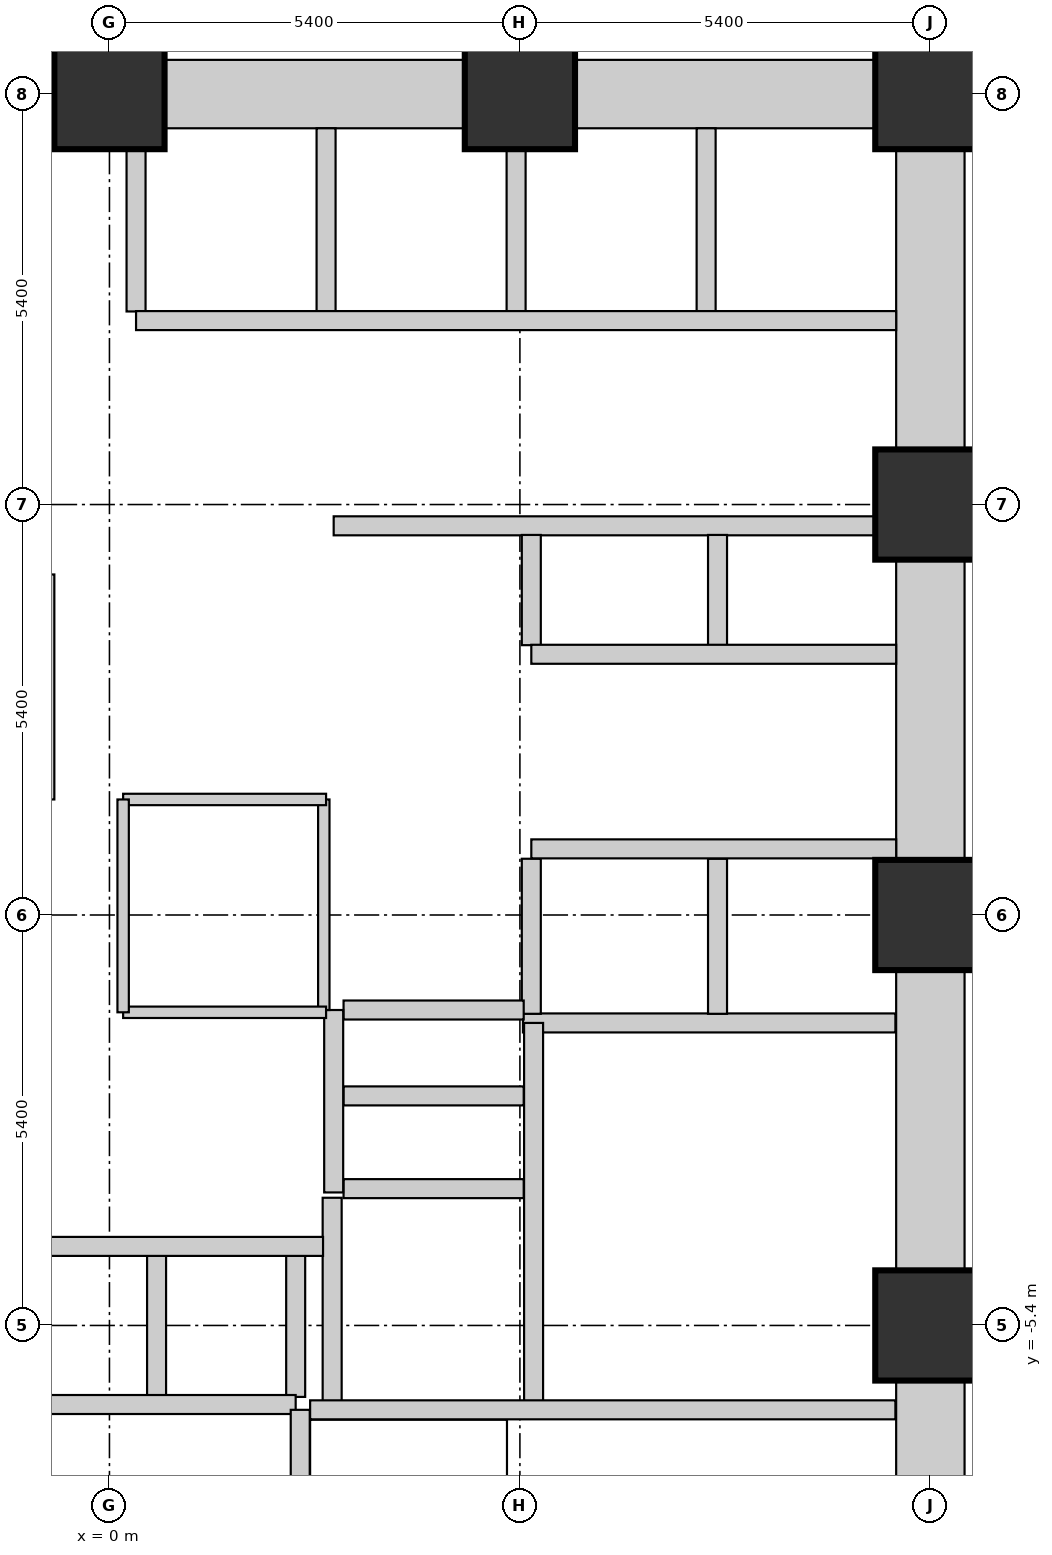
"""IFC4 building model, lengths in metres.
Left out: names, types, materials, properties, quantities, classifications, styles, units other than length and angle.
Written with IfcOpenShell. Run it as: python <this file> out.ifc"""

import sys

from ifc_helpers import new_model, si_unit, direction, frame, frame_2d, origin, origin_2d, place, context, subcontext, project, spatial, rectangle, extrude, element, fill, save


model = new_model("IFC4")
c1 = context("Model", 3, precision=1e-05, world=origin(), true_north=direction((0.0, 1.0)))
c2 = subcontext(c1, "Body", "Model", "MODEL_VIEW")
j1 = project(units=[si_unit("LENGTHUNIT", "METRE"), si_unit("PLANEANGLEUNIT", "RADIAN")], contexts=[c1])
p1 = place(None, origin())
s1 = spatial("IfcSite", under=j1, at=p1, CompositionType="ELEMENT")
p2 = place(p1, origin())
s2 = spatial("IfcBuilding", under=s1, at=p2, CompositionType="ELEMENT")
p3 = place(p2, frame((0.0, 0.0, 9.0)))
s3 = spatial("IfcBuildingStorey", under=s2, at=p3, CompositionType="ELEMENT", Elevation=9.0)
for number, where, z_axis, x_axis in (
    (1, (0.0, 10.8, 0.0), (0.0, 0.0, 1.0), (1.0, 0.0, 0.0)),
    (2, (5.4, 10.8, 0.0), (0.0, 0.0, 1.0), (1.0, 0.0, 0.0)),
    (3, (10.8, -5.4, 0.0), (0.0, 0.0, 1.0), (1.0, 0.0, 0.0)),
    (4, (10.8, 0.0, 0.0), (0.0, 0.0, 1.0), (1.0, 0.0, 0.0)),
    (5, (10.8, 5.4, 0.0), (0.0, 0.0, 1.0), (1.0, 0.0, 0.0)),
    (6, (10.8, 10.8, 0.0), (0.0, 0.0, 1.0), (1.0, 0.0, 0.0)),
):
    element("IfcColumn", number, at=place(p3, frame(where, z_axis=z_axis, x_axis=x_axis)), inside=s3, PredefinedType="COLUMN", context=c2, shape_type="SweptSolid", body=[
        extrude(rectangle(XDim=1.45, YDim=1.45, at=origin_2d()), origin(), (0.0, 0.0, 1.0), 4.5),
    ])
p4 = place(p3, frame((10.8, -10.065, 0.0), z_axis=(0.0, 0.0, 1.0), x_axis=(0.0, 1.0, 0.0)))
e7 = element("IfcWall", 7, at=p4, inside=s3, PredefinedType="SHEAR", context=c2, shape_type="SweptSolid", body=[
    extrude(rectangle(XDim=3.93, YDim=0.9, at=frame_2d((1.965, 0.0))), origin(), (0.0, 0.0, 1.0), 4.5),
])
p5 = place(p3, frame((-4.665, 10.8, 0.0), z_axis=(0.0, 0.0, 1.0), x_axis=(1.0, 0.0, 0.0)))
e8 = element("IfcWall", 8, at=p5, inside=s3, PredefinedType="SHEAR", context=c2, shape_type="SweptSolid", body=[
    extrude(rectangle(XDim=3.93, YDim=0.9, at=frame_2d((1.965, 0.0))), origin(), (0.0, 0.0, 1.0), 4.5),
])
p6 = place(p5, frame((2.58, 0.0, 0.0)))
e9 = element("IfcOpeningElement", 9, at=p6, cuts=e8, PredefinedType="OPENING", context=c2, shape_type="SweptSolid", body=[
    extrude(rectangle(XDim=1.1, YDim=2.1, at=frame_2d((0.55, 1.05))), frame((0.0, 0.46, 0.0), z_axis=(0.0, -1.0, 0.0), x_axis=(1.0, 0.0, 0.0)), (0.0, 0.0, 1.0), 0.92),
])
p7 = place(p3, frame((10.8, -4.665, 0.0), z_axis=(0.0, 0.0, 1.0), x_axis=(0.0, 1.0, 0.0)))
e10 = element("IfcWall", 10, at=p7, inside=s3, PredefinedType="SHEAR", context=c2, shape_type="SweptSolid", body=[
    extrude(rectangle(XDim=3.93, YDim=0.9, at=frame_2d((1.965, 0.0))), origin(), (0.0, 0.0, 1.0), 4.5),
])
p8 = place(p7, frame((1.415, 0.0, 0.0)))
e11 = element("IfcOpeningElement", 11, at=p8, cuts=e10, PredefinedType="OPENING", context=c2, shape_type="SweptSolid", body=[
    extrude(rectangle(XDim=1.1, YDim=2.1, at=frame_2d((0.55, 1.05))), frame((0.0, 0.46, 0.0), z_axis=(0.0, -1.0, 0.0), x_axis=(1.0, 0.0, 0.0)), (0.0, 0.0, 1.0), 0.92),
])
p9 = place(p3, frame((0.735, 10.8, 0.0), z_axis=(0.0, 0.0, 1.0), x_axis=(1.0, 0.0, 0.0)))
e12 = element("IfcWall", 12, at=p9, inside=s3, PredefinedType="SHEAR", context=c2, shape_type="SweptSolid", body=[
    extrude(rectangle(XDim=3.93, YDim=0.9, at=frame_2d((1.965, 0.0))), origin(), (0.0, 0.0, 1.0), 4.5),
])
p10 = place(p3, frame((10.8, 0.735, 0.0), z_axis=(0.0, 0.0, 1.0), x_axis=(0.0, 1.0, 0.0)))
e13 = element("IfcWall", 13, at=p10, inside=s3, PredefinedType="SHEAR", context=c2, shape_type="SweptSolid", body=[
    extrude(rectangle(XDim=3.93, YDim=0.9, at=frame_2d((1.965, 0.0))), origin(), (0.0, 0.0, 1.0), 4.5),
])
p11 = place(p10, frame((1.415, 0.0, 0.0)))
e14 = element("IfcOpeningElement", 14, at=p11, cuts=e13, PredefinedType="OPENING", context=c2, shape_type="SweptSolid", body=[
    extrude(rectangle(XDim=1.1, YDim=2.1, at=frame_2d((0.55, 1.05))), frame((0.0, 0.46, 0.0), z_axis=(0.0, -1.0, 0.0), x_axis=(1.0, 0.0, 0.0)), (0.0, 0.0, 1.0), 0.92),
])
for number, where, z_axis, x_axis in (
    (15, (6.135, 10.8, 0.0), (0.0, 0.0, 1.0), (1.0, 0.0, 0.0)),
    (16, (10.8, 6.135, 0.0), (0.0, 0.0, 1.0), (0.0, 1.0, 0.0)),
):
    element("IfcWall", number, at=place(p3, frame(where, z_axis=z_axis, x_axis=x_axis)), inside=s3, PredefinedType="SHEAR", context=c2, shape_type="SweptSolid", body=[
        extrude(rectangle(XDim=3.93, YDim=0.9, at=frame_2d((1.965, 0.0))), origin(), (0.0, 0.0, 1.0), 4.5),
    ])
p12 = place(p3, frame((2.93, -6.51, 0.0), z_axis=(0.0, 0.0, 1.0), x_axis=(0.0, 1.0, 0.0)))
e17 = element("IfcWall", 17, at=p12, inside=s3, PredefinedType="SHEAR", context=c2, shape_type="SweptSolid", body=[
    extrude(rectangle(XDim=2.79, YDim=0.25, at=frame_2d((1.395, 0.0))), origin(), (0.0, 0.0, 1.0), 4.5),
])
p13 = place(p3, frame((5.44, -1.42, 0.0), z_axis=(0.0, 0.0, 1.0), x_axis=(1.0, 0.0, 0.0)))
e18 = element("IfcWall", 18, at=p13, inside=s3, PredefinedType="SHEAR", context=c2, shape_type="SweptSolid", body=[
    extrude(rectangle(XDim=4.9, YDim=0.25, at=frame_2d((2.45, 0.0))), origin(), (0.0, 0.0, 1.0), 4.5),
])
p14 = place(p3, frame((3.08, -3.6, 0.0), z_axis=(0.0, 0.0, 1.0), x_axis=(1.0, 0.0, 0.0)))
e19 = element("IfcWall", 19, at=p14, inside=s3, PredefinedType="SHEAR", context=c2, shape_type="SweptSolid", body=[
    extrude(rectangle(XDim=2.37, YDim=0.25, at=frame_2d((1.185, 0.0))), origin(), (0.0, 0.0, 1.0), 4.5),
])
p15 = place(p3, frame((5.58, -6.51, 0.0), z_axis=(0.0, 0.0, 1.0), x_axis=(0.0, 1.0, 0.0)))
e20 = element("IfcWall", 20, at=p15, inside=s3, PredefinedType="SHEAR", context=c2, shape_type="SweptSolid", body=[
    extrude(rectangle(XDim=5.09, YDim=0.25, at=frame_2d((2.545, 0.0))), origin(), (0.0, 0.0, 1.0), 4.5),
])
p16 = place(p15, frame((0.85, 0.0, 0.0)))
e21 = element("IfcOpeningElement", 21, at=p16, cuts=e20, PredefinedType="OPENING", context=c2, shape_type="SweptSolid", body=[
    extrude(rectangle(XDim=1.1, YDim=2.1, at=frame_2d((0.55, 1.05))), frame((0.0, 0.135, 0.0), z_axis=(0.0, -1.0, 0.0), x_axis=(1.0, 0.0, 0.0)), (0.0, 0.0, 1.0), 0.27),
])
for number, where, z_axis, x_axis in (
    (22, (0.62, -6.34, 0.0), (0.0, 0.0, 1.0), (0.0, 1.0, 0.0)),
    (23, (2.45, -6.34, 0.0), (0.0, 0.0, 1.0), (0.0, 1.0, 0.0)),
):
    element("IfcWall", number, at=place(p3, frame(where, z_axis=z_axis, x_axis=x_axis)), inside=s3, PredefinedType="SHEAR", context=c2, shape_type="SweptSolid", body=[
        extrude(rectangle(XDim=1.88, YDim=0.25, at=frame_2d((0.94, 0.0))), origin(), (0.0, 0.0, 1.0), 4.5),
    ])
p17 = place(p3, frame((-1.22, -6.44, 0.0), z_axis=(0.0, 0.0, 1.0), x_axis=(1.0, 0.0, 0.0)))
e24 = element("IfcWall", 24, at=p17, inside=s3, PredefinedType="SHEAR", context=c2, shape_type="SweptSolid", body=[
    extrude(rectangle(XDim=3.67, YDim=0.25, at=frame_2d((1.835, 0.0))), origin(), (0.0, 0.0, 1.0), 4.5),
])
p18 = place(p3, frame((-1.22, -4.36, 0.0), z_axis=(0.0, 0.0, 1.0), x_axis=(1.0, 0.0, 0.0)))
e25 = element("IfcWall", 25, at=p18, inside=s3, PredefinedType="SHEAR", context=c2, shape_type="SweptSolid", body=[
    extrude(rectangle(XDim=4.03, YDim=0.25, at=frame_2d((2.015, 0.0))), origin(), (0.0, 0.0, 1.0), 4.5),
])
p19 = place(p3, frame((2.85, 7.94, 0.0), z_axis=(0.0, 0.0, 1.0), x_axis=(0.0, 1.0, 0.0)))
e26 = element("IfcWall", 26, at=p19, inside=s3, PredefinedType="SHEAR", context=c2, shape_type="SweptSolid", body=[
    extrude(rectangle(XDim=2.41, YDim=0.25, at=frame_2d((1.205, 0.0))), origin(), (0.0, 0.0, 1.0), 4.5),
])
for number, where, z_axis, x_axis in (
    (27, (0.35, 7.94, 0.0), (0.0, 0.0, 1.0), (0.0, 1.0, 0.0)),
    (28, (5.35, 7.94, 0.0), (0.0, 0.0, 1.0), (0.0, 1.0, 0.0)),
):
    element("IfcWall", number, at=place(p3, frame(where, z_axis=z_axis, x_axis=x_axis)), inside=s3, PredefinedType="SHEAR", context=c2, shape_type="SweptSolid", body=[
        extrude(rectangle(XDim=2.135, YDim=0.25, at=frame_2d((1.067, 0.0))), origin(), (0.0, 0.0, 1.0), 4.5),
    ])
p20 = place(p3, frame((7.85, 7.94, 0.0), z_axis=(0.0, 0.0, 1.0), x_axis=(0.0, 1.0, 0.0)))
e29 = element("IfcWall", 29, at=p20, inside=s3, PredefinedType="SHEAR", context=c2, shape_type="SweptSolid", body=[
    extrude(rectangle(XDim=2.41, YDim=0.25, at=frame_2d((1.205, 0.0))), origin(), (0.0, 0.0, 1.0), 4.5),
])
p21 = place(p3, frame((0.35, 7.82, 0.0), z_axis=(0.0, 0.0, 1.0), x_axis=(1.0, 0.0, 0.0)))
e30 = element("IfcWall", 30, at=p21, inside=s3, PredefinedType="SHEAR", context=c2, shape_type="SweptSolid", body=[
    extrude(rectangle(XDim=10.0, YDim=0.25, at=frame_2d((5.0, 0.0))), origin(), (0.0, 0.0, 1.0), 4.5),
])
p22 = place(p21, frame((0.7, 0.0, 0.0)))
e31 = element("IfcOpeningElement", 31, at=p22, cuts=e30, PredefinedType="OPENING", context=c2, shape_type="SweptSolid", body=[
    extrude(rectangle(XDim=1.1, YDim=2.1, at=frame_2d((0.55, 1.05))), frame((0.0, 0.135, 0.0), z_axis=(0.0, -1.0, 0.0), x_axis=(1.0, 0.0, 0.0)), (0.0, 0.0, 1.0), 0.27),
])
p23 = place(p21, frame((3.2, 0.0, 0.0)))
e32 = element("IfcOpeningElement", 32, at=p23, cuts=e30, PredefinedType="OPENING", context=c2, shape_type="SweptSolid", body=[
    extrude(rectangle(XDim=1.1, YDim=2.1, at=frame_2d((0.55, 1.05))), frame((0.0, 0.135, 0.0), z_axis=(0.0, -1.0, 0.0), x_axis=(1.0, 0.0, 0.0)), (0.0, 0.0, 1.0), 0.27),
])
p24 = place(p21, frame((5.7, 0.0, 0.0)))
e33 = element("IfcOpeningElement", 33, at=p24, cuts=e30, PredefinedType="OPENING", context=c2, shape_type="SweptSolid", body=[
    extrude(rectangle(XDim=1.1, YDim=2.1, at=frame_2d((0.55, 1.05))), frame((0.0, 0.135, 0.0), z_axis=(0.0, -1.0, 0.0), x_axis=(1.0, 0.0, 0.0)), (0.0, 0.0, 1.0), 0.27),
])
p25 = place(p21, frame((8.2, 0.0, 0.0)))
e34 = element("IfcOpeningElement", 34, at=p25, cuts=e30, PredefinedType="OPENING", context=c2, shape_type="SweptSolid", body=[
    extrude(rectangle(XDim=1.1, YDim=2.1, at=frame_2d((0.55, 1.05))), frame((0.0, 0.135, 0.0), z_axis=(0.0, -1.0, 0.0), x_axis=(1.0, 0.0, 0.0)), (0.0, 0.0, 1.0), 0.27),
])
p26 = place(p3, frame((2.95, 5.12, 0.0), z_axis=(0.0, 0.0, 1.0), x_axis=(1.0, 0.0, 0.0)))
e35 = element("IfcWall", 35, at=p26, inside=s3, PredefinedType="SHEAR", context=c2, shape_type="SweptSolid", body=[
    extrude(rectangle(XDim=7.125, YDim=0.25, at=frame_2d((3.562, 0.0))), origin(), (0.0, 0.0, 1.0), 4.5),
])
for number, where, z_axis, x_axis in (
    (36, (5.55, 3.55, 0.0), (0.0, 0.0, 1.0), (0.0, 1.0, 0.0)),
    (37, (8.0, 3.55, 0.0), (0.0, 0.0, 1.0), (0.0, 1.0, 0.0)),
):
    element("IfcWall", number, at=place(p3, frame(where, z_axis=z_axis, x_axis=x_axis)), inside=s3, PredefinedType="SHEAR", context=c2, shape_type="SweptSolid", body=[
        extrude(rectangle(XDim=1.45, YDim=0.25, at=frame_2d((0.725, 0.0))), origin(), (0.0, 0.0, 1.0), 4.5),
    ])
for number, where, z_axis, x_axis in (
    (38, (5.55, -1.3, 0.0), (0.0, 0.0, 1.0), (0.0, 1.0, 0.0)),
    (39, (8.0, -1.3, 0.0), (0.0, 0.0, 1.0), (0.0, 1.0, 0.0)),
):
    element("IfcWall", number, at=place(p3, frame(where, z_axis=z_axis, x_axis=x_axis)), inside=s3, PredefinedType="SHEAR", context=c2, shape_type="SweptSolid", body=[
        extrude(rectangle(XDim=2.04, YDim=0.25, at=frame_2d((1.02, 0.0))), origin(), (0.0, 0.0, 1.0), 4.5),
    ])
for number, where, z_axis, x_axis in (
    (40, (5.55, 3.43, 0.0), (0.0, 0.0, 1.0), (1.0, 0.0, 0.0)),
    (41, (5.55, 0.87, 0.0), (0.0, 0.0, 1.0), (1.0, 0.0, 0.0)),
):
    element("IfcWall", number, at=place(p3, frame(where, z_axis=z_axis, x_axis=x_axis)), inside=s3, PredefinedType="SHEAR", context=c2, shape_type="SweptSolid", body=[
        extrude(rectangle(XDim=4.8, YDim=0.25, at=frame_2d((2.4, 0.0))), origin(), (0.0, 0.0, 1.0), 4.5),
    ])
for number, where, z_axis, x_axis in (
    (42, (3.08, -2.38, 0.0), (0.0, 0.0, 1.0), (1.0, 0.0, 0.0)),
    (43, (3.08, -1.25, 0.0), (0.0, 0.0, 1.0), (1.0, 0.0, 0.0)),
):
    element("IfcWall", number, at=place(p3, frame(where, z_axis=z_axis, x_axis=x_axis)), inside=s3, PredefinedType="SHEAR", context=c2, shape_type="SweptSolid", body=[
        extrude(rectangle(XDim=2.37, YDim=0.25, at=frame_2d((1.185, 0.0))), origin(), (0.0, 0.0, 1.0), 4.5),
    ])
p27 = place(p3, frame((2.95, -3.65, 0.0), z_axis=(0.0, 0.0, 1.0), x_axis=(0.0, 1.0, 0.0)))
e44 = element("IfcWall", 44, at=p27, inside=s3, PredefinedType="SHEAR", context=c2, shape_type="SweptSolid", body=[
    extrude(rectangle(XDim=2.4, YDim=0.25, at=frame_2d((1.2, 0.0))), origin(), (0.0, 0.0, 1.0), 4.5),
])
p28 = place(p27, frame((0.775, 0.0, 0.0)))
e45 = element("IfcOpeningElement", 45, at=p28, cuts=e44, PredefinedType="OPENING", context=c2, shape_type="SweptSolid", body=[
    extrude(rectangle(XDim=0.85, YDim=2.1, at=frame_2d((0.425, 1.05))), frame((0.0, 0.135, 0.0), z_axis=(0.0, -1.0, 0.0), x_axis=(1.0, 0.0, 0.0)), (0.0, 0.0, 1.0), 0.27),
])
p29 = place(p3, frame((2.64, -6.51, 0.0), z_axis=(0.0, 0.0, 1.0), x_axis=(1.0, 0.0, 0.0)))
e46 = element("IfcWall", 46, at=p29, inside=s3, PredefinedType="SHEAR", context=c2, shape_type="SweptSolid", body=[
    extrude(rectangle(XDim=7.7, YDim=0.25, at=frame_2d((3.85, 0.0))), origin(), (0.0, 0.0, 1.0), 4.5),
])
p30 = place(p29, frame((6.0, 0.0, 0.0)))
e47 = element("IfcOpeningElement", 47, at=p30, cuts=e46, PredefinedType="OPENING", context=c2, shape_type="SweptSolid", body=[
    extrude(rectangle(XDim=0.95, YDim=2.1, at=frame_2d((0.475, 1.05))), frame((0.0, 0.135, 0.0), z_axis=(0.0, -1.0, 0.0), x_axis=(1.0, 0.0, 0.0)), (0.0, 0.0, 1.0), 0.27),
])
p31 = place(p3, frame((2.51, -10.35, 0.0), z_axis=(0.0, 0.0, 1.0), x_axis=(0.0, 1.0, 0.0)))
e48 = element("IfcWall", 48, at=p31, inside=s3, PredefinedType="SHEAR", context=c2, shape_type="SweptSolid", body=[
    extrude(rectangle(XDim=3.84, YDim=0.25, at=frame_2d((1.92, 0.0))), origin(), (0.0, 0.0, 1.0), 4.5),
])
p32 = place(p3, frame((2.82, -1.25, 0.0), z_axis=(0.0, 0.0, 1.0), x_axis=(0.0, 1.0, 0.0)))
e49 = element("IfcWall", 49, at=p32, inside=s3, PredefinedType="PARTITIONING", context=c2, shape_type="SweptSolid", body=[
    extrude(rectangle(XDim=2.77, YDim=0.15, at=frame_2d((1.385, 0.0))), origin(), (0.0, 0.0, 1.0), 4.25),
])
for number, where, z_axis, x_axis in (
    (50, (0.18, 1.52, 0.0), (0.0, 0.0, 1.0), (1.0, 0.0, 0.0)),
    (51, (0.18, -1.28, 0.0), (0.0, 0.0, 1.0), (1.0, 0.0, 0.0)),
):
    element("IfcWall", number, at=place(p3, frame(where, z_axis=z_axis, x_axis=x_axis)), inside=s3, PredefinedType="PARTITIONING", context=c2, shape_type="SweptSolid", body=[
        extrude(rectangle(XDim=2.67, YDim=0.15, at=frame_2d((1.335, 0.0))), origin(), (0.0, 0.0, 1.0), 4.25),
    ])
p33 = place(p3, frame((0.18, -1.28, 0.0), z_axis=(0.0, 0.0, 1.0), x_axis=(0.0, 1.0, 0.0)))
e52 = element("IfcWall", 52, at=p33, inside=s3, PredefinedType="PARTITIONING", context=c2, shape_type="SweptSolid", body=[
    extrude(rectangle(XDim=2.8, YDim=0.15, at=frame_2d((1.4, 0.0))), origin(), (0.0, 0.0, 1.0), 4.25),
])
p34 = place(p33, frame((0.85, 0.0, 0.0)))
e53 = element("IfcOpeningElement", 53, at=p34, cuts=e52, PredefinedType="OPENING", context=c2, shape_type="SweptSolid", body=[
    extrude(rectangle(XDim=0.85, YDim=2.1, at=frame_2d((0.425, 1.05))), frame((0.0, 0.085, 0.0), z_axis=(0.0, -1.0, 0.0), x_axis=(1.0, 0.0, 0.0)), (0.0, 0.0, 1.0), 0.17),
])
p35 = place(p3, frame((-0.8, 1.52, 0.0), z_axis=(0.0, 0.0, 1.0), x_axis=(0.0, 1.0, 0.0)))
e54 = element("IfcWall", 54, at=p35, inside=s3, PredefinedType="PARTITIONING", context=c2, shape_type="SweptSolid", body=[
    extrude(rectangle(XDim=2.96, YDim=0.15, at=frame_2d((1.48, 0.0))), origin(), (0.0, 0.0, 1.0), 4.25),
])
p36 = place(p35, frame((0.95, 0.0, 0.0)))
e55 = element("IfcOpeningElement", 55, at=p36, cuts=e54, PredefinedType="OPENING", context=c2, shape_type="SweptSolid", body=[
    extrude(rectangle(XDim=0.85, YDim=2.1, at=frame_2d((0.425, 1.05))), frame((0.0, 0.085, 0.0), z_axis=(0.0, -1.0, 0.0), x_axis=(1.0, 0.0, 0.0)), (0.0, 0.0, 1.0), 0.17),
])
p37 = place(p34, origin())
e56 = element("IfcDoor", 56, at=p37, inside=s3, OperationType="SINGLE_SWING_RIGHT", PredefinedType="DOOR", context=c2, shape_type="SweptSolid", body=[
    extrude(rectangle(XDim=0.85, YDim=2.1, at=frame_2d((0.425, 1.05))), frame((0.0, 0.025, 0.0), z_axis=(0.0, -1.0, 0.0), x_axis=(1.0, 0.0, 0.0)), (0.0, 0.0, 1.0), 0.05),
])
fill(e53, e56)
p38 = place(p30, origin())
e57 = element("IfcDoor", 57, at=p38, inside=s3, OperationType="SINGLE_SWING_RIGHT", PredefinedType="DOOR", context=c2, shape_type="SweptSolid", body=[
    extrude(rectangle(XDim=0.95, YDim=2.1, at=frame_2d((0.475, 1.05))), frame((0.0, 0.025, 0.0), z_axis=(0.0, -1.0, 0.0), x_axis=(1.0, 0.0, 0.0)), (0.0, 0.0, 1.0), 0.05),
])
fill(e47, e57)
p39 = place(p28, origin())
e58 = element("IfcDoor", 58, at=p39, inside=s3, OperationType="SINGLE_SWING_LEFT", PredefinedType="DOOR", context=c2, shape_type="SweptSolid", body=[
    extrude(rectangle(XDim=0.85, YDim=2.1, at=frame_2d((0.425, 1.05))), frame((0.0, 0.025, 0.0), z_axis=(0.0, -1.0, 0.0), x_axis=(1.0, 0.0, 0.0)), (0.0, 0.0, 1.0), 0.05),
])
fill(e45, e58)
p40 = place(p8, origin())
e59 = element("IfcDoor", 59, at=p40, inside=s3, OperationType="SINGLE_SWING_RIGHT", PredefinedType="DOOR", context=c2, shape_type="SweptSolid", body=[
    extrude(rectangle(XDim=1.1, YDim=2.1, at=frame_2d((0.55, 1.05))), frame((0.0, 0.025, 0.0), z_axis=(0.0, -1.0, 0.0), x_axis=(1.0, 0.0, 0.0)), (0.0, 0.0, 1.0), 0.05),
])
fill(e11, e59)
p41 = place(p16, origin())
e60 = element("IfcDoor", 60, at=p41, inside=s3, OperationType="SLIDING_TO_RIGHT", PredefinedType="DOOR", context=c2, shape_type="SweptSolid", body=[
    extrude(rectangle(XDim=1.1, YDim=2.1, at=frame_2d((0.55, 1.05))), frame((0.0, 0.025, 0.0), z_axis=(0.0, -1.0, 0.0), x_axis=(1.0, 0.0, 0.0)), (0.0, 0.0, 1.0), 0.05),
])
fill(e21, e60)
p42 = place(p22, origin())
e61 = element("IfcDoor", 61, at=p42, inside=s3, OperationType="SLIDING_TO_LEFT", PredefinedType="DOOR", context=c2, shape_type="SweptSolid", body=[
    extrude(rectangle(XDim=1.1, YDim=2.1, at=frame_2d((0.55, 1.05))), frame((0.0, 0.025, 0.0), z_axis=(0.0, -1.0, 0.0), x_axis=(1.0, 0.0, 0.0)), (0.0, 0.0, 1.0), 0.05),
])
fill(e31, e61)
p43 = place(p23, origin())
e62 = element("IfcDoor", 62, at=p43, inside=s3, OperationType="SLIDING_TO_LEFT", PredefinedType="DOOR", context=c2, shape_type="SweptSolid", body=[
    extrude(rectangle(XDim=1.1, YDim=2.1, at=frame_2d((0.55, 1.05))), frame((0.0, 0.025, 0.0), z_axis=(0.0, -1.0, 0.0), x_axis=(1.0, 0.0, 0.0)), (0.0, 0.0, 1.0), 0.05),
])
fill(e32, e62)
p44 = place(p24, origin())
e63 = element("IfcDoor", 63, at=p44, inside=s3, OperationType="SLIDING_TO_LEFT", PredefinedType="DOOR", context=c2, shape_type="SweptSolid", body=[
    extrude(rectangle(XDim=1.1, YDim=2.1, at=frame_2d((0.55, 1.05))), frame((0.0, 0.025, 0.0), z_axis=(0.0, -1.0, 0.0), x_axis=(1.0, 0.0, 0.0)), (0.0, 0.0, 1.0), 0.05),
])
fill(e33, e63)
p45 = place(p25, origin())
e64 = element("IfcDoor", 64, at=p45, inside=s3, OperationType="SLIDING_TO_LEFT", PredefinedType="DOOR", context=c2, shape_type="SweptSolid", body=[
    extrude(rectangle(XDim=1.1, YDim=2.1, at=frame_2d((0.55, 1.05))), frame((0.0, 0.025, 0.0), z_axis=(0.0, -1.0, 0.0), x_axis=(1.0, 0.0, 0.0)), (0.0, 0.0, 1.0), 0.05),
])
fill(e34, e64)
p46 = place(p11, origin())
e65 = element("IfcDoor", 65, at=p46, inside=s3, OperationType="SINGLE_SWING_LEFT", PredefinedType="DOOR", context=c2, shape_type="SweptSolid", body=[
    extrude(rectangle(XDim=1.1, YDim=2.1, at=frame_2d((0.55, 1.05))), frame((0.0, 0.025, 0.0), z_axis=(0.0, -1.0, 0.0), x_axis=(1.0, 0.0, 0.0)), (0.0, 0.0, 1.0), 0.05),
])
fill(e14, e65)
save(model, sys.argv[1])
